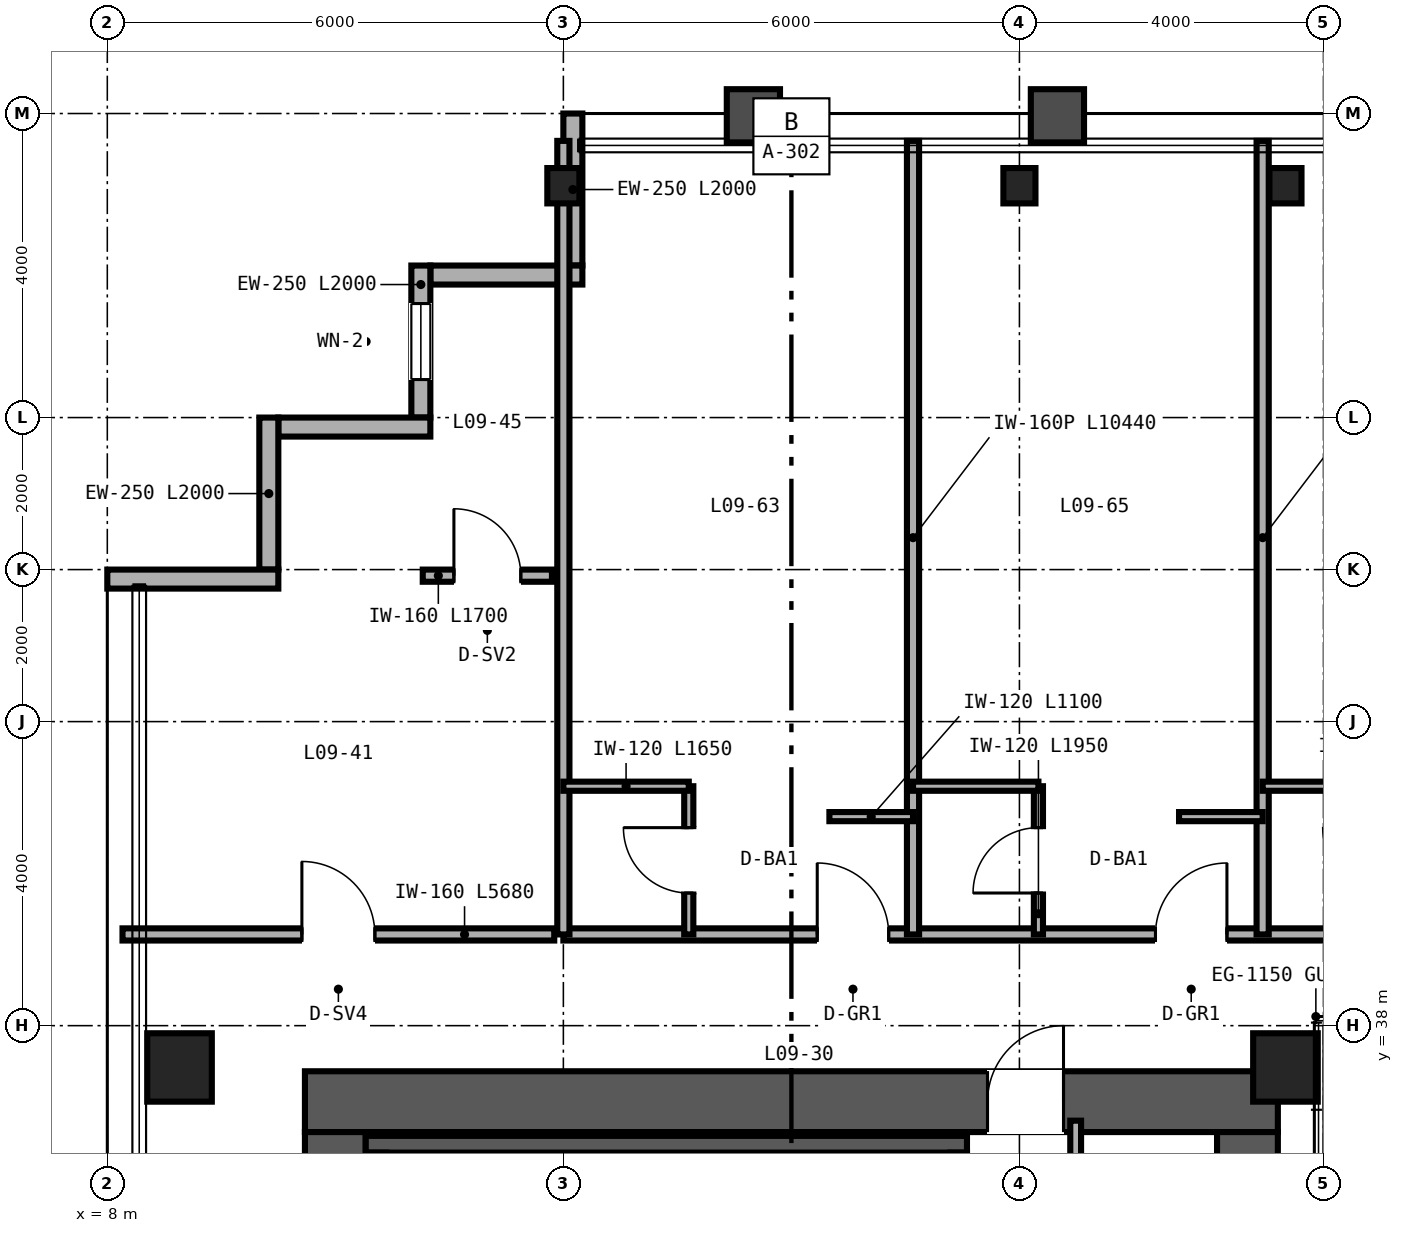
"""IFC4 building model, lengths in metres.
Left out: names, types, materials, properties, quantities, classifications, styles, units other than length and angle.
Written with IfcOpenShell. Run it as: python <this file> out.ifc"""

import sys

from ifc_helpers import new_model, si_unit, direction, frame, frame_2d, origin, origin_2d, place, context, subcontext, project, spatial, rectangle, hollow_rectangle, i_section, extrude, source, transform, mapped, element, fill, save


model = new_model("IFC4")
c1 = context("Model", 3, precision=1e-05, world=origin(), true_north=direction((0.0, 1.0)))
c2 = subcontext(c1, "Body", "Model", "MODEL_VIEW")
j1 = project(units=[si_unit("LENGTHUNIT", "METRE"), si_unit("PLANEANGLEUNIT", "RADIAN")], contexts=[c1])
p1 = place(None, origin())
s1 = spatial("IfcSite", under=j1, at=p1, CompositionType="ELEMENT")
p2 = place(p1, origin())
s2 = spatial("IfcBuilding", under=s1, at=p2, CompositionType="ELEMENT")
p3 = place(p2, frame((0.0, 0.0, 42.0)))
s3 = spatial("IfcBuildingStorey", under=s2, at=p3, CompositionType="ELEMENT", Elevation=42.0)
p4 = place(p3, frame((10.6, 37.0, 0.0), z_axis=(0.0, 0.0, 1.0), x_axis=(1.0, 0.0, 0.0)))
e1 = element("IfcWall", 1, at=p4, inside=s3, PredefinedType="SHEAR", context=c2, shape_type="SweptSolid", body=[
    extrude(rectangle(XDim=12.8, YDim=0.8, at=frame_2d((6.4, 0.0))), origin(), (0.0, 0.0, 1.0), 3.35),
])
p5 = place(p4, frame((8.98, 0.0, 0.0)))
e2 = element("IfcOpeningElement", 2, at=p5, cuts=e1, PredefinedType="OPENING", context=c2, shape_type="SweptSolid", body=[
    extrude(rectangle(XDim=1.0, YDim=2.15, at=frame_2d((0.5, 1.075))), frame((0.0, 0.41, 0.0), z_axis=(0.0, -1.0, 0.0), x_axis=(1.0, 0.0, 0.0)), (0.0, 0.0, 1.0), 0.82),
])
for number, where, z_axis, x_axis in (
    (3, (11.0, 15.4, 0.0), (0.0, 0.0, 1.0), (0.0, 1.0, 0.0)),
    (4, (23.0, 15.4, 0.0), (0.0, 0.0, 1.0), (0.0, 1.0, 0.0)),
):
    element("IfcWall", number, at=place(p3, frame(where, z_axis=z_axis, x_axis=x_axis)), inside=s3, PredefinedType="SHEAR", context=c2, shape_type="SweptSolid", body=[
        extrude(rectangle(XDim=21.2, YDim=0.8, at=frame_2d((10.6, 0.0))), origin(), (0.0, 0.0, 1.0), 3.35),
    ])
p6 = place(p3, frame((11.4, 36.44, 0.0), z_axis=(0.0, 0.0, 1.0), x_axis=(1.0, 0.0, 0.0)))
e5 = element("IfcWall", 5, at=p6, inside=s3, PredefinedType="SHEAR", context=c2, shape_type="SweptSolid", body=[
    extrude(rectangle(XDim=7.91, YDim=0.22, at=frame_2d((3.955, 0.0))), origin(), (0.0, 0.0, 1.0), 3.4),
])
for number, where, z_axis, x_axis in (
    (6, (11.56, 33.05, 0.0), (0.0, 0.0, 1.0), (0.0, 1.0, 0.0)),
    (7, (19.2, 33.05, 0.0), (0.0, 0.0, 1.0), (0.0, 1.0, 0.0)),
):
    element("IfcWall", number, at=place(p3, frame(where, z_axis=z_axis, x_axis=x_axis)), inside=s3, PredefinedType="SHEAR", context=c2, shape_type="SweptSolid", body=[
        extrude(rectangle(XDim=3.28, YDim=0.22, at=frame_2d((1.64, 0.0))), origin(), (0.0, 0.0, 1.0), 3.4),
    ])
m1 = source(origin(), c2, "Body", "SweptSolid", [
    extrude(hollow_rectangle(XDim=0.85, YDim=0.9, WallThickness=0.04, at=origin_2d()), origin(), (0.0, 0.0, 1.0), 3.35),
])
for number, where, z_axis, x_axis in (
    (8, (8.95, 37.45, 0.0), (0.0, 0.0, 1.0), (1.0, 0.0, 0.0)),
    (9, (23.5, 37.45, 0.0), (0.0, 0.0, 1.0), (1.0, 0.0, 0.0)),
):
    element("IfcColumn", number, at=place(p3, frame(where, z_axis=z_axis, x_axis=x_axis)), inside=s3, PredefinedType="COLUMN", context=c2, shape_type="MappedRepresentation", body=[
        mapped(m1, transform((0.0, 0.0, 0.0), scale=1.0)),
    ])
m2 = source(origin(), c2, "Body", "SweptSolid", [
    extrude(i_section(OverallWidth=0.422, OverallDepth=0.465, WebThickness=0.045, FlangeThickness=0.073, FilletRadius=0.025, at=origin_2d()), origin(), (0.0, 0.0, 1.0), 3.35),
])
for number, where, z_axis, x_axis in (
    (10, (14.0, 49.05, 0.0), (0.0, 0.0, 1.0), (1.0, 0.0, 0.0)),
    (11, (20.0, 49.05, 0.0), (0.0, 0.0, 1.0), (1.0, 0.0, 0.0)),
    (12, (23.5, 49.05, 0.0), (0.0, 0.0, 1.0), (1.0, 0.0, 0.0)),
):
    element("IfcColumn", number, at=place(p3, frame(where, z_axis=z_axis, x_axis=x_axis)), inside=s3, PredefinedType="COLUMN", context=c2, shape_type="MappedRepresentation", body=[
        mapped(m2, transform((0.0, 0.0, 0.0), scale=1.0)),
    ])
p7 = place(p3, frame((14.125, 50.0, 0.0), z_axis=(0.0, 0.0, 1.0), x_axis=(0.0, -1.0, 0.0)))
e13 = element("IfcWall", 13, at=p7, inside=s3, PredefinedType="SOLIDWALL", context=c2, shape_type="SweptSolid", body=[
    extrude(rectangle(XDim=2.0, YDim=0.25, at=frame_2d((1.0, 0.0))), origin(), (0.0, 0.0, 1.0), 2.657),
])
p8 = place(p3, frame((14.25, 47.875, 0.0), z_axis=(0.0, 0.0, 1.0), x_axis=(-1.0, 0.0, 0.0)))
e14 = element("IfcWall", 14, at=p8, inside=s3, PredefinedType="SOLIDWALL", context=c2, shape_type="SweptSolid", body=[
    extrude(rectangle(XDim=2.0, YDim=0.25, at=frame_2d((1.0, 0.0))), origin(), (0.0, 0.0, 1.0), 3.35),
])
p9 = place(p3, frame((12.125, 48.0, 0.0), z_axis=(0.0, 0.0, 1.0), x_axis=(0.0, -1.0, 0.0)))
e15 = element("IfcWall", 15, at=p9, inside=s3, PredefinedType="SOLIDWALL", context=c2, shape_type="SweptSolid", body=[
    extrude(rectangle(XDim=2.0, YDim=0.25, at=frame_2d((1.0, 0.0))), origin(), (0.0, 0.0, 1.0), 3.35),
])
p10 = place(p9, frame((0.5, 0.0, 0.85)))
e16 = element("IfcOpeningElement", 16, at=p10, cuts=e15, PredefinedType="OPENING", context=c2, shape_type="SweptSolid", body=[
    extrude(rectangle(XDim=1.0, YDim=1.9, at=frame_2d((0.5, 0.95))), frame((0.0, 0.135, 0.0), z_axis=(0.0, -1.0, 0.0), x_axis=(1.0, 0.0, 0.0)), (0.0, 0.0, 1.0), 0.27),
])
for number, where, z_axis, x_axis in (
    (17, (12.25, 45.875, 0.0), (0.0, 0.0, 1.0), (-1.0, 0.0, 0.0)),
    (18, (10.125, 46.0, 0.0), (0.0, 0.0, 1.0), (0.0, -1.0, 0.0)),
):
    element("IfcWall", number, at=place(p3, frame(where, z_axis=z_axis, x_axis=x_axis)), inside=s3, PredefinedType="SOLIDWALL", context=c2, shape_type="SweptSolid", body=[
        extrude(rectangle(XDim=2.0, YDim=0.25, at=frame_2d((1.0, 0.0))), origin(), (0.0, 0.0, 1.0), 3.35),
    ])
p11 = place(p3, frame((10.25, 43.875, 0.0), z_axis=(0.0, 0.0, 1.0), x_axis=(-1.0, 0.0, 0.0)))
e19 = element("IfcWall", 19, at=p11, inside=s3, PredefinedType="SOLIDWALL", context=c2, shape_type="SweptSolid", body=[
    extrude(rectangle(XDim=2.25, YDim=0.25, at=frame_2d((1.125, 0.0))), origin(), (0.0, 0.0, 1.0), 3.35),
])
p12 = place(p3, frame((20.74, 34.92, 0.0), z_axis=(0.0, 0.0, 1.0), x_axis=(0.0, 1.0, 0.0)))
e20 = element("IfcWall", 20, at=p12, inside=s3, PredefinedType="PARTITIONING", context=c2, shape_type="SweptSolid", body=[
    extrude(rectangle(XDim=1.83, YDim=0.142, at=frame_2d((0.915, 0.0))), origin(), (0.0, 0.0, 1.0), 3.35),
])
p13 = place(p3, frame((8.2, 39.2, 0.0), z_axis=(0.0, 0.0, 1.0), x_axis=(1.0, 0.0, 0.0)))
e21 = element("IfcWall", 21, at=p13, inside=s3, PredefinedType="PARTITIONING", context=c2, shape_type="SweptSolid", body=[
    extrude(rectangle(XDim=5.68, YDim=0.16, at=frame_2d((2.84, 0.0))), origin(), (0.0, 0.0, 1.0), 3.35),
])
p14 = place(p13, frame((2.36, 0.0, 0.0)))
e22 = element("IfcOpeningElement", 22, at=p14, cuts=e21, PredefinedType="OPENING", context=c2, shape_type="SweptSolid", body=[
    extrude(rectangle(XDim=0.96, YDim=2.15, at=frame_2d((0.48, 1.075))), frame((0.0, 0.09, 0.0), z_axis=(0.0, -1.0, 0.0), x_axis=(1.0, 0.0, 0.0)), (0.0, 0.0, 1.0), 0.18),
])
p15 = place(p3, frame((12.15, 43.92, 0.0), z_axis=(0.0, 0.0, 1.0), x_axis=(1.0, 0.0, 0.0)))
e23 = element("IfcWall", 23, at=p15, inside=s3, PredefinedType="PARTITIONING", context=c2, shape_type="SweptSolid", body=[
    extrude(rectangle(XDim=1.7, YDim=0.16, at=frame_2d((0.85, 0.0))), origin(), (0.0, 0.0, 1.0), 3.35),
])
p16 = place(p15, frame((0.41, 0.0, 0.0)))
e24 = element("IfcOpeningElement", 24, at=p16, cuts=e23, PredefinedType="OPENING", context=c2, shape_type="SweptSolid", body=[
    extrude(rectangle(XDim=0.88, YDim=2.15, at=frame_2d((0.44, 1.075))), frame((0.0, 0.09, 0.0), z_axis=(0.0, -1.0, 0.0), x_axis=(1.0, 0.0, 0.0)), (0.0, 0.0, 1.0), 0.18),
])
p17 = place(p3, frame((14.0, 39.2, 0.0), z_axis=(0.0, 0.0, 1.0), x_axis=(1.0, 0.0, 0.0)))
e25 = element("IfcWall", 25, at=p17, inside=s3, PredefinedType="PARTITIONING", context=c2, shape_type="SweptSolid", body=[
    extrude(rectangle(XDim=36.0, YDim=0.16, at=frame_2d((18.0, 0.0))), origin(), (0.0, 0.0, 1.0), 2.571),
])
p18 = place(p17, frame((3.34, 0.0, 0.0)))
e26 = element("IfcOpeningElement", 26, at=p18, cuts=e25, PredefinedType="OPENING", context=c2, shape_type="SweptSolid", body=[
    extrude(rectangle(XDim=0.94, YDim=2.15, at=frame_2d((0.47, 1.075))), frame((0.0, 0.09, 0.0), z_axis=(0.0, -1.0, 0.0), x_axis=(1.0, 0.0, 0.0)), (0.0, 0.0, 1.0), 0.18),
])
p19 = place(p17, frame((7.79, 0.0, 0.0)))
e27 = element("IfcOpeningElement", 27, at=p19, cuts=e25, PredefinedType="OPENING", context=c2, shape_type="SweptSolid", body=[
    extrude(rectangle(XDim=0.94, YDim=2.15, at=frame_2d((0.47, 1.075))), frame((0.0, 0.09, 0.0), z_axis=(0.0, -1.0, 0.0), x_axis=(1.0, 0.0, 0.0)), (0.0, 0.0, 1.0), 0.18),
])
p20 = place(p17, frame((12.54, 0.0, 0.0)))
e28 = element("IfcOpeningElement", 28, at=p20, cuts=e25, PredefinedType="OPENING", context=c2, shape_type="SweptSolid", body=[
    extrude(rectangle(XDim=0.94, YDim=2.15, at=frame_2d((0.47, 1.075))), frame((0.0, 0.09, 0.0), z_axis=(0.0, -1.0, 0.0), x_axis=(1.0, 0.0, 0.0)), (0.0, 0.0, 1.0), 0.18),
])
p21 = place(p17, frame((17.14, 0.0, 0.0)))
e29 = element("IfcOpeningElement", 29, at=p21, cuts=e25, PredefinedType="OPENING", context=c2, shape_type="SweptSolid", body=[
    extrude(rectangle(XDim=0.94, YDim=2.15, at=frame_2d((0.47, 1.075))), frame((0.0, 0.09, 0.0), z_axis=(0.0, -1.0, 0.0), x_axis=(1.0, 0.0, 0.0)), (0.0, 0.0, 1.0), 0.18),
])
p22 = place(p17, frame((21.74, 0.0, 0.0)))
e30 = element("IfcOpeningElement", 30, at=p22, cuts=e25, PredefinedType="OPENING", context=c2, shape_type="SweptSolid", body=[
    extrude(rectangle(XDim=0.94, YDim=2.15, at=frame_2d((0.47, 1.075))), frame((0.0, 0.09, 0.0), z_axis=(0.0, -1.0, 0.0), x_axis=(1.0, 0.0, 0.0)), (0.0, 0.0, 1.0), 0.18),
])
p23 = place(p17, frame((24.89, 0.0, 0.0)))
e31 = element("IfcOpeningElement", 31, at=p23, cuts=e25, PredefinedType="OPENING", context=c2, shape_type="SweptSolid", body=[
    extrude(rectangle(XDim=0.94, YDim=2.15, at=frame_2d((0.47, 1.075))), frame((0.0, 0.09, 0.0), z_axis=(0.0, -1.0, 0.0), x_axis=(1.0, 0.0, 0.0)), (0.0, 0.0, 1.0), 0.18),
])
p24 = place(p17, frame((30.54, 0.0, 0.0)))
e32 = element("IfcOpeningElement", 32, at=p24, cuts=e25, PredefinedType="OPENING", context=c2, shape_type="SweptSolid", body=[
    extrude(rectangle(XDim=0.94, YDim=2.15, at=frame_2d((0.47, 1.075))), frame((0.0, 0.09, 0.0), z_axis=(0.0, -1.0, 0.0), x_axis=(1.0, 0.0, 0.0)), (0.0, 0.0, 1.0), 0.18),
])
p25 = place(p17, frame((34.74, 0.0, 0.0)))
e33 = element("IfcOpeningElement", 33, at=p25, cuts=e25, PredefinedType="OPENING", context=c2, shape_type="SweptSolid", body=[
    extrude(rectangle(XDim=0.94, YDim=2.15, at=frame_2d((0.47, 1.075))), frame((0.0, 0.09, 0.0), z_axis=(0.0, -1.0, 0.0), x_axis=(1.0, 0.0, 0.0)), (0.0, 0.0, 1.0), 0.18),
])
for number, where, z_axis, x_axis in (
    (34, (14.0, 39.2, 0.0), (0.0, 0.0, 1.0), (0.0, 1.0, 0.0)),
    (35, (18.6, 39.2, 0.0), (0.0, 0.0, 1.0), (0.0, 1.0, 0.0)),
):
    element("IfcWall", number, at=place(p3, frame(where, z_axis=z_axis, x_axis=x_axis)), inside=s3, PredefinedType="PARTITIONING", context=c2, shape_type="SweptSolid", body=[
        extrude(rectangle(XDim=10.44, YDim=0.16, at=frame_2d((5.22, 0.0))), origin(), (0.0, 0.0, 1.0), 2.657),
    ])
p26 = place(p3, frame((15.65, 39.2, 0.0), z_axis=(0.0, 0.0, 1.0), x_axis=(0.0, 1.0, 0.0)))
e36 = element("IfcWall", 36, at=p26, inside=s3, PredefinedType="PARTITIONING", context=c2, shape_type="SweptSolid", body=[
    extrude(rectangle(XDim=1.95, YDim=0.12, at=frame_2d((0.975, 0.0))), origin(), (0.0, 0.0, 1.0), 3.35),
])
p27 = place(p26, frame((0.545, 0.0, 0.0)))
e37 = element("IfcOpeningElement", 37, at=p27, cuts=e36, PredefinedType="OPENING", context=c2, shape_type="SweptSolid", body=[
    extrude(rectangle(XDim=0.86, YDim=2.1, at=frame_2d((0.43, 1.05))), frame((0.0, 0.07, 0.0), z_axis=(0.0, -1.0, 0.0), x_axis=(1.0, 0.0, 0.0)), (0.0, 0.0, 1.0), 0.14),
])
p28 = place(p3, frame((14.0, 41.15, 0.0), z_axis=(0.0, 0.0, 1.0), x_axis=(1.0, 0.0, 0.0)))
e38 = element("IfcWall", 38, at=p28, inside=s3, PredefinedType="PARTITIONING", context=c2, shape_type="SweptSolid", body=[
    extrude(rectangle(XDim=1.65, YDim=0.12, at=frame_2d((0.825, 0.0))), origin(), (0.0, 0.0, 1.0), 3.35),
])
p29 = place(p3, frame((17.5, 40.75, 0.0), z_axis=(0.0, 0.0, 1.0), x_axis=(1.0, 0.0, 0.0)))
e39 = element("IfcWall", 39, at=p29, inside=s3, PredefinedType="PARTITIONING", context=c2, shape_type="SweptSolid", body=[
    extrude(rectangle(XDim=1.1, YDim=0.12, at=frame_2d((0.55, 0.0))), origin(), (0.0, 0.0, 1.0), 3.35),
])
p30 = place(p3, frame((23.2, 39.2, 0.0), z_axis=(0.0, 0.0, 1.0), x_axis=(0.0, 1.0, 0.0)))
e40 = element("IfcWall", 40, at=p30, inside=s3, PredefinedType="PARTITIONING", context=c2, shape_type="SweptSolid", body=[
    extrude(rectangle(XDim=10.44, YDim=0.16, at=frame_2d((5.22, 0.0))), origin(), (0.0, 0.0, 1.0), 2.813),
])
p31 = place(p3, frame((20.25, 39.2, 0.0), z_axis=(0.0, 0.0, 1.0), x_axis=(0.0, 1.0, 0.0)))
e41 = element("IfcWall", 41, at=p31, inside=s3, PredefinedType="PARTITIONING", context=c2, shape_type="SweptSolid", body=[
    extrude(rectangle(XDim=1.95, YDim=0.12, at=frame_2d((0.975, 0.0))), origin(), (0.0, 0.0, 1.0), 3.35),
])
p32 = place(p31, frame((0.545, 0.0, 0.0)))
e42 = element("IfcOpeningElement", 42, at=p32, cuts=e41, PredefinedType="OPENING", context=c2, shape_type="SweptSolid", body=[
    extrude(rectangle(XDim=0.86, YDim=2.1, at=frame_2d((0.43, 1.05))), frame((0.0, 0.07, 0.0), z_axis=(0.0, -1.0, 0.0), x_axis=(1.0, 0.0, 0.0)), (0.0, 0.0, 1.0), 0.14),
])
p33 = place(p3, frame((18.6, 41.15, 0.0), z_axis=(0.0, 0.0, 1.0), x_axis=(1.0, 0.0, 0.0)))
e43 = element("IfcWall", 43, at=p33, inside=s3, PredefinedType="PARTITIONING", context=c2, shape_type="SweptSolid", body=[
    extrude(rectangle(XDim=1.65, YDim=0.12, at=frame_2d((0.825, 0.0))), origin(), (0.0, 0.0, 1.0), 3.35),
])
p34 = place(p3, frame((22.1, 40.75, 0.0), z_axis=(0.0, 0.0, 1.0), x_axis=(1.0, 0.0, 0.0)))
e44 = element("IfcWall", 44, at=p34, inside=s3, PredefinedType="PARTITIONING", context=c2, shape_type="SweptSolid", body=[
    extrude(rectangle(XDim=1.1, YDim=0.12, at=frame_2d((0.55, 0.0))), origin(), (0.0, 0.0, 1.0), 3.35),
])
p35 = place(p3, frame((23.2, 41.15, 0.0), z_axis=(0.0, 0.0, 1.0), x_axis=(1.0, 0.0, 0.0)))
e45 = element("IfcWall", 45, at=p35, inside=s3, PredefinedType="PARTITIONING", context=c2, shape_type="SweptSolid", body=[
    extrude(rectangle(XDim=1.65, YDim=0.12, at=frame_2d((0.825, 0.0))), origin(), (0.0, 0.0, 1.0), 2.571),
])
m3 = source(origin(), c2, "Body", "SweptSolid", [
    extrude(rectangle(XDim=1.0, YDim=1.9, at=frame_2d((0.5, 0.95))), frame((0.0, 0.03, 0.0), z_axis=(0.0, -1.0, 0.0), x_axis=(1.0, 0.0, 0.0)), (0.0, 0.0, 1.0), 0.06),
])
p36 = place(p10, origin())
e46 = element("IfcWindow", 46, at=p36, inside=s3, PartitioningType="SINGLE_PANEL", PredefinedType="WINDOW", context=c2, shape_type="MappedRepresentation", body=[
    mapped(m3, transform((0.0, 0.0, 0.0), scale=1.0)),
])
fill(e16, e46)
m4 = source(origin(), c2, "Body", "SweptSolid", [
    extrude(rectangle(XDim=1.0, YDim=2.15, at=frame_2d((0.5, 1.075))), frame((0.0, 0.025, 0.0), z_axis=(0.0, -1.0, 0.0), x_axis=(1.0, 0.0, 0.0)), (0.0, 0.0, 1.0), 0.05),
])
p37 = place(p5, origin())
e47 = element("IfcDoor", 47, at=p37, inside=s3, OperationType="SINGLE_SWING_RIGHT", PredefinedType="DOOR", context=c2, shape_type="MappedRepresentation", body=[
    mapped(m4, transform((0.0, 0.0, 0.0), scale=1.0)),
])
fill(e2, e47)
m5 = source(origin(), c2, "Body", "SweptSolid", [
    extrude(rectangle(XDim=0.96, YDim=2.15, at=frame_2d((0.48, 1.075))), frame((0.0, 0.025, 0.0), z_axis=(0.0, -1.0, 0.0), x_axis=(1.0, 0.0, 0.0)), (0.0, 0.0, 1.0), 0.05),
])
p38 = place(p14, origin())
e48 = element("IfcDoor", 48, at=p38, inside=s3, OperationType="SINGLE_SWING_LEFT", PredefinedType="DOOR", context=c2, shape_type="MappedRepresentation", body=[
    mapped(m5, transform((0.0, 0.0, 0.0), scale=1.0)),
])
fill(e22, e48)
m6 = source(origin(), c2, "Body", "SweptSolid", [
    extrude(rectangle(XDim=0.88, YDim=2.15, at=frame_2d((0.44, 1.075))), frame((0.0, 0.025, 0.0), z_axis=(0.0, -1.0, 0.0), x_axis=(1.0, 0.0, 0.0)), (0.0, 0.0, 1.0), 0.05),
])
p39 = place(p16, origin())
e49 = element("IfcDoor", 49, at=p39, inside=s3, OperationType="SINGLE_SWING_LEFT", PredefinedType="DOOR", context=c2, shape_type="MappedRepresentation", body=[
    mapped(m6, transform((0.0, 0.0, 0.0), scale=1.0)),
])
fill(e24, e49)
m7 = source(origin(), c2, "Body", "SweptSolid", [
    extrude(rectangle(XDim=0.86, YDim=2.1, at=frame_2d((0.43, 1.05))), frame((0.0, 0.025, 0.0), z_axis=(0.0, -1.0, 0.0), x_axis=(1.0, 0.0, 0.0)), (0.0, 0.0, 1.0), 0.05),
])
p40 = place(p27, origin())
e50 = element("IfcDoor", 50, at=p40, inside=s3, OperationType="SINGLE_SWING_RIGHT", PredefinedType="DOOR", context=c2, shape_type="MappedRepresentation", body=[
    mapped(m7, transform((0.0, 0.0, 0.0), scale=1.0)),
])
fill(e37, e50)
p41 = place(p32, origin())
e51 = element("IfcDoor", 51, at=p41, inside=s3, OperationType="SINGLE_SWING_LEFT", PredefinedType="DOOR", context=c2, shape_type="MappedRepresentation", body=[
    mapped(m7, transform((0.0, 0.0, 0.0), scale=1.0)),
])
fill(e42, e51)
m8 = source(origin(), c2, "Body", "SweptSolid", [
    extrude(rectangle(XDim=0.94, YDim=2.15, at=frame_2d((0.47, 1.075))), frame((0.0, 0.025, 0.0), z_axis=(0.0, -1.0, 0.0), x_axis=(1.0, 0.0, 0.0)), (0.0, 0.0, 1.0), 0.05),
])
p42 = place(p18, origin())
e52 = element("IfcDoor", 52, at=p42, inside=s3, OperationType="SINGLE_SWING_LEFT", PredefinedType="DOOR", context=c2, shape_type="MappedRepresentation", body=[
    mapped(m8, transform((0.0, 0.0, 0.0), scale=1.0)),
])
fill(e26, e52)
p43 = place(p19, origin())
e53 = element("IfcDoor", 53, at=p43, inside=s3, OperationType="SINGLE_SWING_RIGHT", PredefinedType="DOOR", context=c2, shape_type="MappedRepresentation", body=[
    mapped(m8, transform((0.0, 0.0, 0.0), scale=1.0)),
])
fill(e27, e53)
save(model, sys.argv[1])
